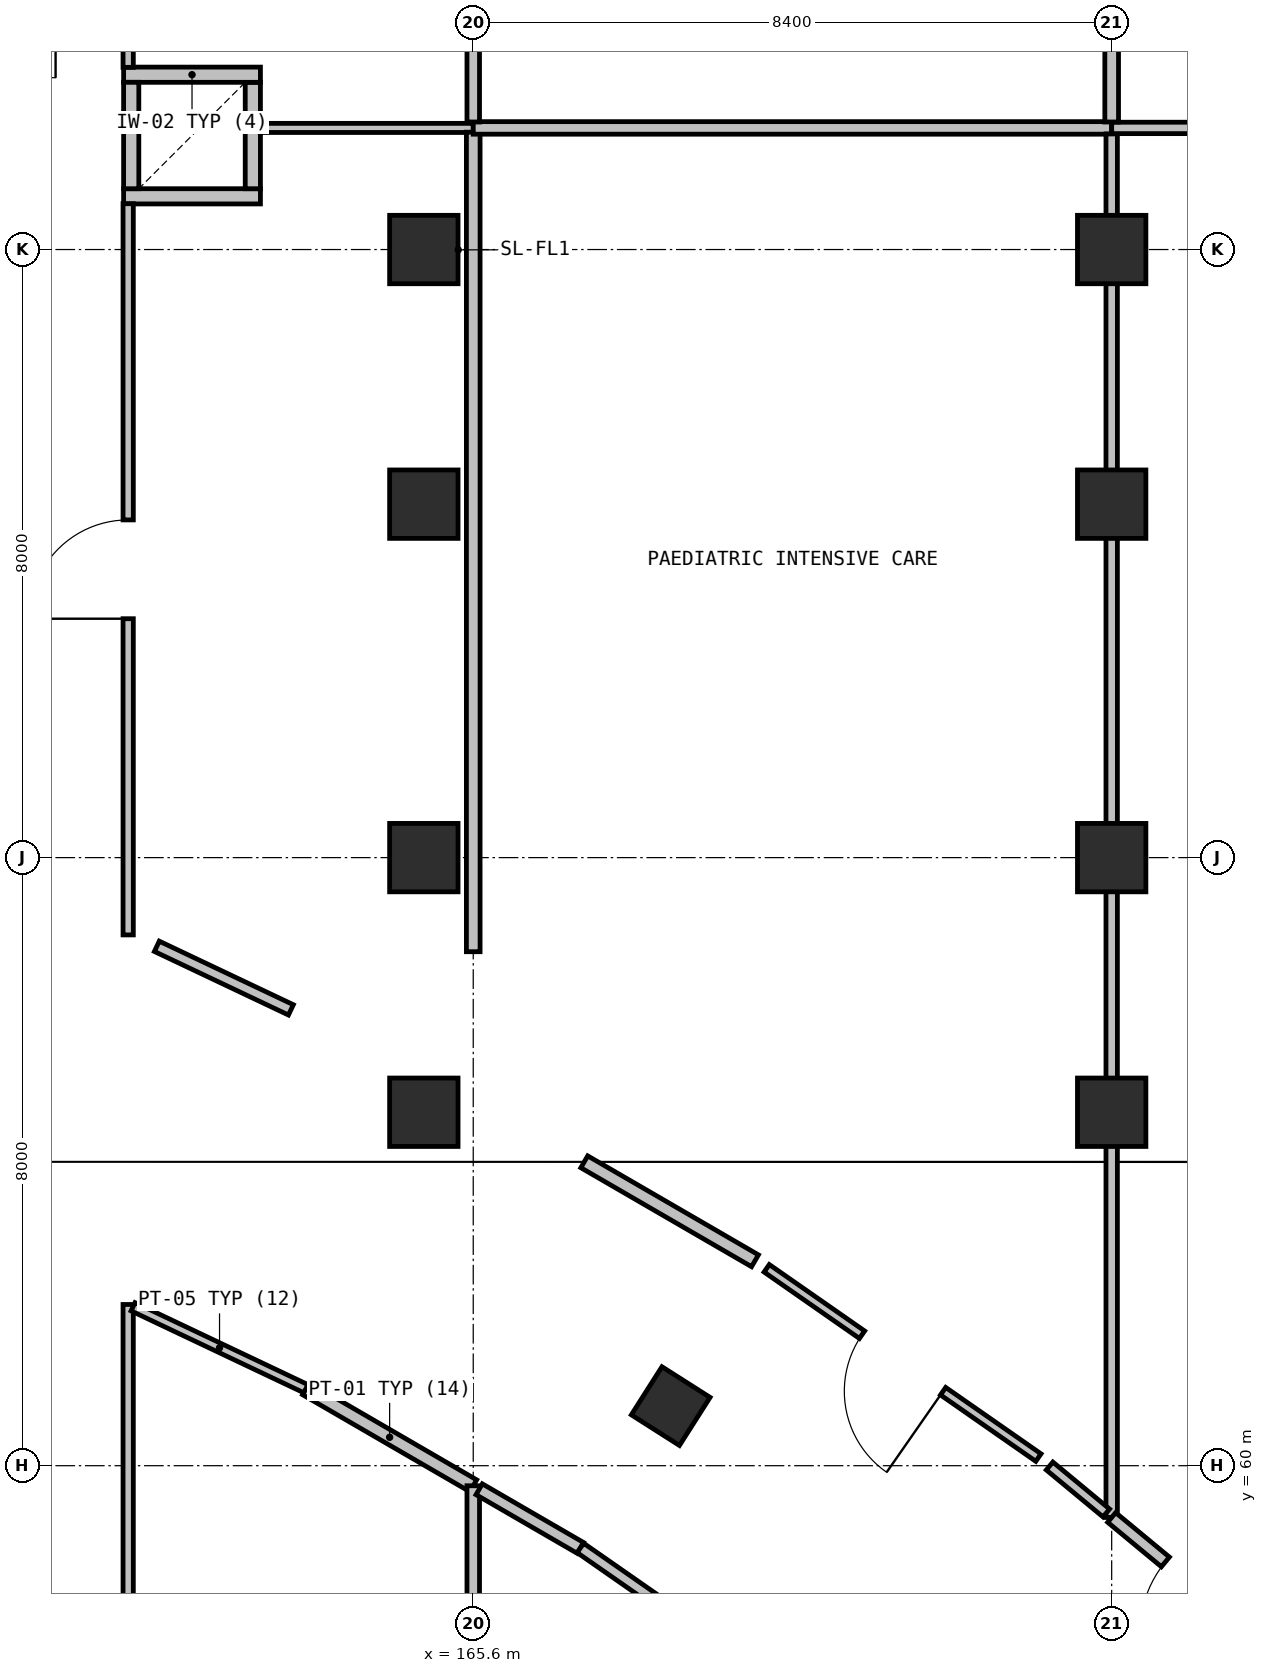
"""IFC4 building model, lengths in metres.
Left out: names, types, materials, properties, quantities, classifications, styles, units other than length and angle.
Written with IfcOpenShell. Run it as: python <this file> out.ifc"""

import sys

from ifc_helpers import new_model, si_unit, direction, frame, frame_2d, origin, origin_2d, place, context, subcontext, project, spatial, rectangle, extrude, element, fill, save


model = new_model("IFC4")
c1 = context("Model", 3, precision=1e-05, world=origin(), true_north=direction((0.0, 1.0)))
c2 = subcontext(c1, "Body", "Model", "MODEL_VIEW")
j1 = project(units=[si_unit("LENGTHUNIT", "METRE"), si_unit("PLANEANGLEUNIT", "RADIAN")], contexts=[c1])
p1 = place(None, origin())
s1 = spatial("IfcSite", under=j1, at=p1, CompositionType="ELEMENT")
p2 = place(p1, origin())
s2 = spatial("IfcBuilding", under=s1, at=p2, CompositionType="ELEMENT")
p3 = place(p2, frame((0.0, 0.0, 5.4)))
s3 = spatial("IfcBuildingStorey", under=s2, at=p3, CompositionType="ELEMENT", Elevation=5.4)
for number, where, z_axis, x_axis in (
    (1, (164.95, 64.65, 0.0), (0.0, 0.0, 1.0), (1.0, 0.0, 0.0)),
    (2, (164.95, 68.0, 0.0), (0.0, 0.0, 1.0), (1.0, 0.0, 0.0)),
    (3, (164.95, 72.65, 0.0), (0.0, 0.0, 1.0), (1.0, 0.0, 0.0)),
    (4, (164.95, 76.0, 0.0), (0.0, 0.0, 1.0), (1.0, 0.0, 0.0)),
    (5, (174.0, 64.65, 0.0), (0.0, 0.0, 1.0), (1.0, 0.0, 0.0)),
    (6, (174.0, 68.0, 0.0), (0.0, 0.0, 1.0), (1.0, 0.0, 0.0)),
    (7, (174.0, 72.65, 0.0), (0.0, 0.0, 1.0), (1.0, 0.0, 0.0)),
    (8, (174.0, 76.0, 0.0), (0.0, 0.0, 1.0), (1.0, 0.0, 0.0)),
):
    element("IfcColumn", number, at=place(p3, frame(where, z_axis=z_axis, x_axis=x_axis)), inside=s3, PredefinedType="COLUMN", context=c2, shape_type="SweptSolid", body=[
        extrude(rectangle(XDim=0.9, YDim=0.9, at=origin_2d()), origin(), (0.0, 0.0, 1.0), 4.8),
    ])
p4 = place(p3, frame((168.198, 60.784, 0.0), z_axis=(0.0, 0.0, 1.0), x_axis=(0.537064068078, 0.843541455282, 0.0)))
e9 = element("IfcColumn", 9, at=p4, inside=s3, PredefinedType="COLUMN", context=c2, shape_type="SweptSolid", body=[
    extrude(rectangle(XDim=0.75, YDim=0.75, at=origin_2d()), origin(), (0.0, 0.0, 1.0), 4.8),
])
p5 = place(p3, frame((161.0, 76.7, 0.0), z_axis=(0.0, 0.0, 1.0), x_axis=(1.0, 0.0, 0.0)))
e10 = element("IfcWall", 10, at=p5, inside=s3, PredefinedType="SOLIDWALL", context=c2, shape_type="SweptSolid", body=[
    extrude(rectangle(XDim=1.8, YDim=0.2, at=frame_2d((0.9, 0.0))), origin(), (0.0, 0.0, 1.0), 4.445),
])
p6 = place(p3, frame((162.7, 76.8, 0.0), z_axis=(0.0, 0.0, 1.0), x_axis=(0.0, 1.0, 0.0)))
e11 = element("IfcWall", 11, at=p6, inside=s3, PredefinedType="SOLIDWALL", context=c2, shape_type="SweptSolid", body=[
    extrude(rectangle(XDim=1.4, YDim=0.2, at=frame_2d((0.7, 0.0))), origin(), (0.0, 0.0, 1.0), 4.445),
])
p7 = place(p3, frame((162.8, 78.3, 0.0), z_axis=(0.0, 0.0, 1.0), x_axis=(-1.0, 0.0, 0.0)))
e12 = element("IfcWall", 12, at=p7, inside=s3, PredefinedType="SOLIDWALL", context=c2, shape_type="SweptSolid", body=[
    extrude(rectangle(XDim=1.8, YDim=0.2, at=frame_2d((0.9, 0.0))), origin(), (0.0, 0.0, 1.0), 4.445),
])
p8 = place(p3, frame((161.1, 78.2, 0.0), z_axis=(0.0, 0.0, 1.0), x_axis=(0.0, -1.0, 0.0)))
e13 = element("IfcWall", 13, at=p8, inside=s3, PredefinedType="SOLIDWALL", context=c2, shape_type="SweptSolid", body=[
    extrude(rectangle(XDim=1.4, YDim=0.2, at=frame_2d((0.7, 0.0))), origin(), (0.0, 0.0, 1.0), 4.445),
])
p9 = place(p3, frame((161.06, 50.0, 0.0), z_axis=(0.0, 0.0, 1.0), x_axis=(0.0, 1.0, 0.0)))
e14 = element("IfcWall", 14, at=p9, inside=s3, PredefinedType="PARTITIONING", context=c2, shape_type="SweptSolid", body=[
    extrude(rectangle(XDim=12.121, YDim=0.135, at=frame_2d((6.061, 0.0))), origin(), (0.0, 0.0, 1.0), 4.445),
])
p10 = place(p9, frame((5.461, 0.0, 0.0)))
e15 = element("IfcOpeningElement", 15, at=p10, cuts=e14, PredefinedType="OPENING", context=c2, shape_type="SweptSolid", body=[
    extrude(rectangle(XDim=1.2, YDim=2.15, at=frame_2d((0.6, 1.075))), frame((0.0, 0.077, 0.0), z_axis=(0.0, -1.0, 0.0), x_axis=(1.0, 0.0, 0.0)), (0.0, 0.0, 1.0), 0.155),
])
p11 = place(p3, frame((161.124, 62.091, 0.0), z_axis=(0.0, 0.0, 1.0), x_axis=(0.903575932901, -0.428427979341, 0.0)))
e16 = element("IfcWall", 16, at=p11, inside=s3, PredefinedType="PARTITIONING", context=c2, shape_type="SweptSolid", body=[
    extrude(rectangle(XDim=2.519, YDim=0.12, at=frame_2d((1.259, 0.0))), origin(), (0.0, 0.0, 1.0), 4.445),
])
p12 = place(p3, frame((163.4, 61.012, 0.0), z_axis=(0.0, 0.0, 1.0), x_axis=(0.865071180383, -0.501649133231, 0.0)))
e17 = element("IfcWall", 17, at=p12, inside=s3, PredefinedType="PARTITIONING", context=c2, shape_type="SweptSolid", body=[
    extrude(rectangle(XDim=2.543, YDim=0.18, at=frame_2d((1.272, 0.0))), origin(), (0.0, 0.0, 1.0), 4.445),
])
p13 = place(p3, frame((165.6, 59.736, 0.0), z_axis=(0.0, 0.0, 1.0), x_axis=(0.0, -1.0, 0.0)))
e18 = element("IfcWall", 18, at=p13, inside=s3, PredefinedType="PARTITIONING", context=c2, shape_type="SweptSolid", body=[
    extrude(rectangle(XDim=15.71, YDim=0.165, at=frame_2d((7.855, 0.0))), origin(), (0.0, 0.0, 1.0), 4.445),
])
p14 = place(p3, frame((163.201, 65.997, 0.0), z_axis=(0.0, 0.0, 1.0), x_axis=(-0.903658874167, 0.428253008325, 0.0)))
e19 = element("IfcWall", 19, at=p14, inside=s3, PredefinedType="PARTITIONING", context=c2, shape_type="SweptSolid", body=[
    extrude(rectangle(XDim=1.952, YDim=0.15, at=frame_2d((0.976, 0.0))), origin(), (0.0, 0.0, 1.0), 4.445),
])
p15 = place(p3, frame((161.06, 66.983, 0.0), z_axis=(0.0, 0.0, 1.0), x_axis=(0.0, 1.0, 0.0)))
e20 = element("IfcWall", 20, at=p15, inside=s3, PredefinedType="PARTITIONING", context=c2, shape_type="SweptSolid", body=[
    extrude(rectangle(XDim=9.62, YDim=0.135, at=frame_2d((4.81, 0.0))), origin(), (0.0, 0.0, 1.0), 4.445),
])
p16 = place(p15, frame((4.16, 0.0, 0.0)))
e21 = element("IfcOpeningElement", 21, at=p16, cuts=e20, PredefinedType="OPENING", context=c2, shape_type="SweptSolid", body=[
    extrude(rectangle(XDim=1.3, YDim=2.15, at=frame_2d((0.65, 1.075))), frame((0.0, 0.077, 0.0), z_axis=(0.0, -1.0, 0.0), x_axis=(1.0, 0.0, 0.0)), (0.0, 0.0, 1.0), 0.155),
])
p17 = place(p3, frame((162.797, 77.6, 0.0), z_axis=(0.0, 0.0, 1.0), x_axis=(1.0, 0.0, 0.0)))
e22 = element("IfcWall", 22, at=p17, inside=s3, PredefinedType="PARTITIONING", context=c2, shape_type="SweptSolid", body=[
    extrude(rectangle(XDim=2.803, YDim=0.12, at=frame_2d((1.401, 0.0))), origin(), (0.0, 0.0, 1.0), 4.445),
])
p18 = place(p3, frame((165.6, 77.544, 0.0), z_axis=(0.0, 0.0, 1.0), x_axis=(0.0, -1.0, 0.0)))
e23 = element("IfcWall", 23, at=p18, inside=s3, PredefinedType="PARTITIONING", context=c2, shape_type="SweptSolid", body=[
    extrude(rectangle(XDim=10.782, YDim=0.18, at=frame_2d((5.391, 0.0))), origin(), (0.0, 0.0, 1.0), 4.445),
])
p19 = place(p3, frame((165.678, 59.69, 0.0), z_axis=(0.0, 0.0, 1.0), x_axis=(0.865201820635, -0.501423782413, 0.0)))
e24 = element("IfcWall", 24, at=p19, inside=s3, PredefinedType="PARTITIONING", context=c2, shape_type="SweptSolid", body=[
    extrude(rectangle(XDim=1.54, YDim=0.165, at=frame_2d((0.77, 0.0))), origin(), (0.0, 0.0, 1.0), 4.445),
])
p20 = place(p3, frame((167.01, 58.918, 0.0), z_axis=(0.0, 0.0, 1.0), x_axis=(0.820562806153, -0.571556367437, 0.0)))
e25 = element("IfcWall", 25, at=p20, inside=s3, PredefinedType="PARTITIONING", context=c2, shape_type="SweptSolid", body=[
    extrude(rectangle(XDim=4.173, YDim=0.15, at=frame_2d((2.086, 0.0))), origin(), (0.0, 0.0, 1.0), 4.445),
])
p21 = place(p3, frame((173.036, 60.107, 0.0), z_axis=(0.0, 0.0, 1.0), x_axis=(-0.820574971601, 0.571538901547, 0.0)))
e26 = element("IfcWall", 26, at=p21, inside=s3, PredefinedType="PARTITIONING", context=c2, shape_type="SweptSolid", body=[
    extrude(rectangle(XDim=4.357, YDim=0.12, at=frame_2d((2.178, 0.0))), origin(), (0.0, 0.0, 1.0), 4.445),
])
p22 = place(p21, frame((1.528, 0.0, 0.0)))
e27 = element("IfcOpeningElement", 27, at=p22, cuts=e26, PredefinedType="OPENING", context=c2, shape_type="SweptSolid", body=[
    extrude(rectangle(XDim=1.3, YDim=2.15, at=frame_2d((0.65, 1.075))), frame((0.0, 0.07, 0.0), z_axis=(0.0, -1.0, 0.0), x_axis=(1.0, 0.0, 0.0)), (0.0, 0.0, 1.0), 0.14),
])
p23 = place(p3, frame((169.307, 62.696, 0.0), z_axis=(0.0, 0.0, 1.0), x_axis=(-0.86512994763, 0.501547778097, 0.0)))
e28 = element("IfcWall", 28, at=p23, inside=s3, PredefinedType="PARTITIONING", context=c2, shape_type="SweptSolid", body=[
    extrude(rectangle(XDim=2.596, YDim=0.18, at=frame_2d((1.298, 0.0))), origin(), (0.0, 0.0, 1.0), 4.445),
])
p24 = place(p3, frame((165.6, 77.6, 0.0), z_axis=(0.0, 0.0, 1.0), x_axis=(1.0, 0.0, 0.0)))
e29 = element("IfcWall", 29, at=p24, inside=s3, PredefinedType="PARTITIONING", context=c2, shape_type="SweptSolid", body=[
    extrude(rectangle(XDim=8.4, YDim=0.165, at=frame_2d((4.2, 0.0))), origin(), (0.0, 0.0, 1.0), 4.445),
])
p25 = place(p3, frame((174.0, 77.521, 0.0), z_axis=(0.0, 0.0, 1.0), x_axis=(0.0, -1.0, 0.0)))
e30 = element("IfcWall", 30, at=p25, inside=s3, PredefinedType="PARTITIONING", context=c2, shape_type="SweptSolid", body=[
    extrude(rectangle(XDim=18.202, YDim=0.15, at=frame_2d((9.101, 0.0))), origin(), (0.0, 0.0, 1.0), 3.695),
])
p26 = place(p3, frame((173.929, 59.378, 0.0), z_axis=(0.0, 0.0, 1.0), x_axis=(-0.769933113357, 0.638124596733, 0.0)))
e31 = element("IfcWall", 31, at=p26, inside=s3, PredefinedType="PARTITIONING", context=c2, shape_type="SweptSolid", body=[
    extrude(rectangle(XDim=0.969, YDim=0.135, at=frame_2d((0.484, 0.0))), origin(), (0.0, 0.0, 1.0), 4.445),
])
p27 = place(p3, frame((176.53, 57.225, 0.0), z_axis=(0.0, 0.0, 1.0), x_axis=(-0.770367879737, 0.637599662695, 0.0)))
e32 = element("IfcWall", 32, at=p27, inside=s3, PredefinedType="PARTITIONING", context=c2, shape_type="SweptSolid", body=[
    extrude(rectangle(XDim=3.284, YDim=0.165, at=frame_2d((1.642, 0.0))), origin(), (0.0, 0.0, 1.0), 4.445),
])
p28 = place(p27, frame((0.917, 0.0, 0.0)))
e33 = element("IfcOpeningElement", 33, at=p28, cuts=e32, PredefinedType="OPENING", context=c2, shape_type="SweptSolid", body=[
    extrude(rectangle(XDim=1.45, YDim=2.15, at=frame_2d((0.725, 1.075))), frame((0.0, 0.093, 0.0), z_axis=(0.0, -1.0, 0.0), x_axis=(1.0, 0.0, 0.0)), (0.0, 0.0, 1.0), 0.185),
])
p29 = place(p3, frame((174.0, 77.6, 0.0), z_axis=(0.0, 0.0, 1.0), x_axis=(1.0, 0.0, 0.0)))
e34 = element("IfcWall", 34, at=p29, inside=s3, PredefinedType="PARTITIONING", context=c2, shape_type="SweptSolid", body=[
    extrude(rectangle(XDim=7.958, YDim=0.15, at=frame_2d((3.979, 0.0))), origin(), (0.0, 0.0, 1.0), 4.445),
])
p30 = place(p3, frame((161.06, 78.397, 0.0), z_axis=(0.0, 0.0, 1.0), x_axis=(0.0, 1.0, 0.0)))
e35 = element("IfcWall", 35, at=p30, inside=s3, PredefinedType="PARTITIONING", context=c2, shape_type="SweptSolid", body=[
    extrude(rectangle(XDim=1.103, YDim=0.135, at=frame_2d((0.552, 0.0))), origin(), (0.0, 0.0, 1.0), 4.445),
])
p31 = place(p3, frame((165.6, 80.893, 0.0), z_axis=(0.0, 0.0, 1.0), x_axis=(0.0, -1.0, 0.0)))
e36 = element("IfcWall", 36, at=p31, inside=s3, PredefinedType="PARTITIONING", context=c2, shape_type="SweptSolid", body=[
    extrude(rectangle(XDim=3.215, YDim=0.165, at=frame_2d((1.607, 0.0))), origin(), (0.0, 0.0, 1.0), 4.445),
])
p32 = place(p3, frame((174.0, 105.384, 0.0), z_axis=(0.0, 0.0, 1.0), x_axis=(0.0, -1.0, 0.0)))
e37 = element("IfcWall", 37, at=p32, inside=s3, PredefinedType="PARTITIONING", context=c2, shape_type="SweptSolid", body=[
    extrude(rectangle(XDim=27.706, YDim=0.18, at=frame_2d((13.853, 0.0))), origin(), (0.0, 0.0, 1.0), 3.695),
])
p33 = place(p16, origin())
e38 = element("IfcDoor", 38, at=p33, inside=s3, OperationType="SINGLE_SWING_RIGHT", PredefinedType="DOOR", context=c2, shape_type="SweptSolid", body=[
    extrude(rectangle(XDim=1.3, YDim=2.15, at=frame_2d((0.65, 1.075))), frame((0.0, 0.025, 0.0), z_axis=(0.0, -1.0, 0.0), x_axis=(1.0, 0.0, 0.0)), (0.0, 0.0, 1.0), 0.05),
])
fill(e21, e38)
p34 = place(p22, origin())
e39 = element("IfcDoor", 39, at=p34, inside=s3, OperationType="SINGLE_SWING_RIGHT", PredefinedType="DOOR", context=c2, shape_type="SweptSolid", body=[
    extrude(rectangle(XDim=1.3, YDim=2.15, at=frame_2d((0.65, 1.075))), frame((0.0, 0.025, 0.0), z_axis=(0.0, -1.0, 0.0), x_axis=(1.0, 0.0, 0.0)), (0.0, 0.0, 1.0), 0.05),
])
fill(e27, e39)
p35 = place(p28, origin())
e40 = element("IfcDoor", 40, at=p35, inside=s3, OperationType="SINGLE_SWING_LEFT", PredefinedType="DOOR", context=c2, shape_type="SweptSolid", body=[
    extrude(rectangle(XDim=1.45, YDim=2.15, at=frame_2d((0.725, 1.075))), frame((0.0, 0.025, 0.0), z_axis=(0.0, -1.0, 0.0), x_axis=(1.0, 0.0, 0.0)), (0.0, 0.0, 1.0), 0.05),
])
fill(e33, e40)
save(model, sys.argv[1])
